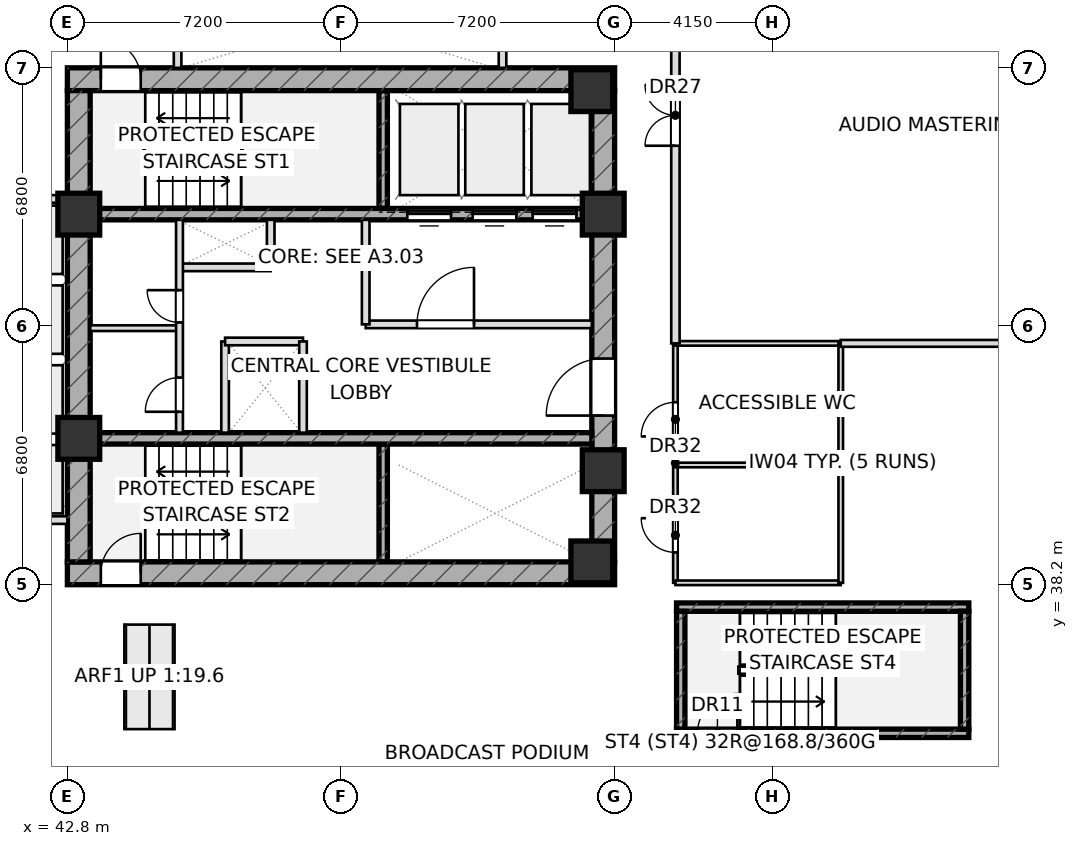
"""IFC4 building model, lengths in metres.
Left out: names, types, materials, properties, quantities, classifications, styles, units other than length and angle.
Written with IfcOpenShell. Run it as: python <this file> out.ifc"""

import sys

from ifc_helpers import new_model, si_unit, direction, frame, frame_2d, origin, origin_2d, place, context, subcontext, project, spatial, rectangle, extrude, element, fill, save


model = new_model("IFC4")
c1 = context("Model", 3, precision=1e-05, world=origin(), true_north=direction((0.0, 1.0)))
c2 = subcontext(c1, "Body", "Model", "MODEL_VIEW")
j1 = project(units=[si_unit("LENGTHUNIT", "METRE"), si_unit("PLANEANGLEUNIT", "RADIAN")], contexts=[c1])
p1 = place(None, origin())
s1 = spatial("IfcSite", under=j1, at=p1, CompositionType="ELEMENT")
p2 = place(p1, origin())
s2 = spatial("IfcBuilding", under=s1, at=p2, CompositionType="ELEMENT")
p3 = place(p2, frame((0.0, 0.0, 11.4)))
s3 = spatial("IfcBuildingStorey", under=s2, at=p3, CompositionType="ELEMENT", Elevation=11.4)
for number, where, z_axis, x_axis in (
    (1, (51.11, 48.1, 0.0), (0.0, 0.0, 1.0), (0.0, 1.0, 0.0)),
    (2, (51.11, 38.8, 0.0), (0.0, 0.0, 1.0), (0.0, 1.0, 0.0)),
):
    element("IfcWall", number, at=place(p3, frame(where, z_axis=z_axis, x_axis=x_axis)), inside=s3, PredefinedType="SHEAR", context=c2, shape_type="SweptSolid", body=[
        extrude(rectangle(XDim=3.1, YDim=0.22, at=frame_2d((1.55, 0.0))), origin(), (0.0, 0.0, 1.0), 5.05),
    ])
p4 = place(p3, frame((58.83, 34.29, 0.0), z_axis=(0.0, 0.0, 1.0), x_axis=(1.0, 0.0, 0.0)))
e3 = element("IfcWall", 3, at=p4, inside=s3, PredefinedType="SHEAR", context=c2, shape_type="SweptSolid", body=[
    extrude(rectangle(XDim=7.69, YDim=0.22, at=frame_2d((3.845, 0.0))), origin(), (0.0, 0.0, 1.0), 5.05),
])
p5 = place(p4, frame((0.55, 0.0, 0.0)))
e4 = element("IfcOpeningElement", 4, at=p5, cuts=e3, PredefinedType="OPENING", context=c2, shape_type="SweptSolid", body=[
    extrude(rectangle(XDim=1.05, YDim=2.2, at=frame_2d((0.525, 1.1))), frame((0.0, 0.12, 0.0), z_axis=(0.0, -1.0, 0.0), x_axis=(1.0, 0.0, 0.0)), (0.0, 0.0, 1.0), 0.24),
])
p6 = place(p3, frame((58.83, 37.61, 0.0), z_axis=(0.0, 0.0, 1.0), x_axis=(1.0, 0.0, 0.0)))
e5 = element("IfcWall", 5, at=p6, inside=s3, PredefinedType="SHEAR", context=c2, shape_type="SweptSolid", body=[
    extrude(rectangle(XDim=7.69, YDim=0.22, at=frame_2d((3.845, 0.0))), origin(), (0.0, 0.0, 1.0), 5.05),
])
for number, where, z_axis, x_axis in (
    (6, (66.41, 34.4, 0.0), (0.0, 0.0, 1.0), (0.0, 1.0, 0.0)),
    (7, (58.94, 34.4, 0.0), (0.0, 0.0, 1.0), (0.0, 1.0, 0.0)),
):
    element("IfcWall", number, at=place(p3, frame(where, z_axis=z_axis, x_axis=x_axis)), inside=s3, PredefinedType="SHEAR", context=c2, shape_type="SweptSolid", body=[
        extrude(rectangle(XDim=3.1, YDim=0.22, at=frame_2d((1.55, 0.0))), origin(), (0.0, 0.0, 1.0), 5.05),
    ])
p7 = place(p3, frame((42.8, 51.5, 0.0), z_axis=(0.0, 0.0, 1.0), x_axis=(1.0, 0.0, 0.0)))
e8 = element("IfcWall", 8, at=p7, inside=s3, PredefinedType="SHEAR", context=c2, shape_type="SweptSolid", body=[
    extrude(rectangle(XDim=14.4, YDim=0.6, at=frame_2d((7.2, 0.0))), origin(), (0.0, 0.0, 1.0), 5.05),
])
p8 = place(p7, frame((0.88, 0.0, 0.0)))
e9 = element("IfcOpeningElement", 9, at=p8, cuts=e8, PredefinedType="OPENING", context=c2, shape_type="SweptSolid", body=[
    extrude(rectangle(XDim=1.05, YDim=2.2, at=frame_2d((0.525, 1.1))), frame((0.0, 0.31, 0.0), z_axis=(0.0, -1.0, 0.0), x_axis=(1.0, 0.0, 0.0)), (0.0, 0.0, 1.0), 0.62),
])
p9 = place(p3, frame((42.8, 38.5, 0.0), z_axis=(0.0, 0.0, 1.0), x_axis=(1.0, 0.0, 0.0)))
e10 = element("IfcWall", 10, at=p9, inside=s3, PredefinedType="SHEAR", context=c2, shape_type="SweptSolid", body=[
    extrude(rectangle(XDim=14.4, YDim=0.6, at=frame_2d((7.2, 0.0))), origin(), (0.0, 0.0, 1.0), 5.05),
])
p10 = place(p9, frame((0.88, 0.0, 0.0)))
e11 = element("IfcOpeningElement", 11, at=p10, cuts=e10, PredefinedType="OPENING", context=c2, shape_type="SweptSolid", body=[
    extrude(rectangle(XDim=1.05, YDim=2.2, at=frame_2d((0.525, 1.1))), frame((0.0, 0.31, 0.0), z_axis=(0.0, -1.0, 0.0), x_axis=(1.0, 0.0, 0.0)), (0.0, 0.0, 1.0), 0.62),
])
p11 = place(p3, frame((43.1, 38.8, 0.0), z_axis=(0.0, 0.0, 1.0), x_axis=(0.0, 1.0, 0.0)))
e12 = element("IfcWall", 12, at=p11, inside=s3, PredefinedType="SHEAR", context=c2, shape_type="SweptSolid", body=[
    extrude(rectangle(XDim=12.4, YDim=0.6, at=frame_2d((6.2, 0.0))), origin(), (0.0, 0.0, 1.0), 5.05),
])
p12 = place(p3, frame((56.9, 38.8, 0.0), z_axis=(0.0, 0.0, 1.0), x_axis=(0.0, 1.0, 0.0)))
e13 = element("IfcWall", 13, at=p12, inside=s3, PredefinedType="SHEAR", context=c2, shape_type="SweptSolid", body=[
    extrude(rectangle(XDim=12.4, YDim=0.6, at=frame_2d((6.2, 0.0))), origin(), (0.0, 0.0, 1.0), 5.05),
])
p13 = place(p12, frame((3.85, 0.0, 0.0)))
e14 = element("IfcOpeningElement", 14, at=p13, cuts=e13, PredefinedType="OPENING", context=c2, shape_type="SweptSolid", body=[
    extrude(rectangle(XDim=1.5, YDim=2.2, at=frame_2d((0.75, 1.1))), frame((0.0, 0.31, 0.0), z_axis=(0.0, -1.0, 0.0), x_axis=(1.0, 0.0, 0.0)), (0.0, 0.0, 1.0), 0.62),
])
p14 = place(p3, frame((43.4, 47.95, 0.0), z_axis=(0.0, 0.0, 1.0), x_axis=(1.0, 0.0, 0.0)))
e15 = element("IfcWall", 15, at=p14, inside=s3, PredefinedType="SHEAR", context=c2, shape_type="SweptSolid", body=[
    extrude(rectangle(XDim=13.2, YDim=0.3, at=frame_2d((6.6, 0.0))), origin(), (0.0, 0.0, 1.0), 5.05),
])
p15 = place(p14, frame((8.345, 0.0, 0.0)))
e16 = element("IfcOpeningElement", 16, at=p15, cuts=e15, PredefinedType="OPENING", context=c2, shape_type="SweptSolid", body=[
    extrude(rectangle(XDim=1.15, YDim=2.2, at=frame_2d((0.575, 1.1))), frame((0.0, 0.16, 0.0), z_axis=(0.0, -1.0, 0.0), x_axis=(1.0, 0.0, 0.0)), (0.0, 0.0, 1.0), 0.32),
])
p16 = place(p14, frame((10.065, 0.0, 0.0)))
e17 = element("IfcOpeningElement", 17, at=p16, cuts=e15, PredefinedType="OPENING", context=c2, shape_type="SweptSolid", body=[
    extrude(rectangle(XDim=1.15, YDim=2.2, at=frame_2d((0.575, 1.1))), frame((0.0, 0.16, 0.0), z_axis=(0.0, -1.0, 0.0), x_axis=(1.0, 0.0, 0.0)), (0.0, 0.0, 1.0), 0.32),
])
p17 = place(p14, frame((11.645, 0.0, 0.0)))
e18 = element("IfcOpeningElement", 18, at=p17, cuts=e15, PredefinedType="OPENING", context=c2, shape_type="SweptSolid", body=[
    extrude(rectangle(XDim=1.15, YDim=2.2, at=frame_2d((0.575, 1.1))), frame((0.0, 0.16, 0.0), z_axis=(0.0, -1.0, 0.0), x_axis=(1.0, 0.0, 0.0)), (0.0, 0.0, 1.0), 0.32),
])
p18 = place(p3, frame((43.4, 42.05, 0.0), z_axis=(0.0, 0.0, 1.0), x_axis=(1.0, 0.0, 0.0)))
e19 = element("IfcWall", 19, at=p18, inside=s3, PredefinedType="SHEAR", context=c2, shape_type="SweptSolid", body=[
    extrude(rectangle(XDim=13.2, YDim=0.3, at=frame_2d((6.6, 0.0))), origin(), (0.0, 0.0, 1.0), 5.05),
])
for number, where, z_axis, x_axis in (
    (20, (43.1, 47.95, 0.0), (0.0, 0.0, 1.0), (1.0, 0.0, 0.0)),
    (21, (56.9, 47.95, 0.0), (0.0, 0.0, 1.0), (1.0, 0.0, 0.0)),
    (22, (56.6, 51.2, 0.0), (0.0, 0.0, 1.0), (1.0, 0.0, 0.0)),
    (23, (43.1, 42.05, 0.0), (0.0, 0.0, 1.0), (1.0, 0.0, 0.0)),
    (24, (56.9, 41.2, 0.0), (0.0, 0.0, 1.0), (1.0, 0.0, 0.0)),
    (25, (56.6, 38.8, 0.0), (0.0, 0.0, 1.0), (1.0, 0.0, 0.0)),
):
    element("IfcColumn", number, at=place(p3, frame(where, z_axis=z_axis, x_axis=x_axis)), inside=s3, PredefinedType="COLUMN", context=c2, shape_type="SweptSolid", body=[
        extrude(rectangle(XDim=1.1, YDim=1.1, at=origin_2d()), origin(), (0.0, 0.0, 1.0), 5.05),
    ])
for number, where, z_axis, x_axis in (
    (26, (40.3, 39.9, 0.0), (0.0, 0.0, 1.0), (1.0, 0.0, 0.0)),
    (27, (40.3, 48.35, 0.0), (0.0, 0.0, 1.0), (1.0, 0.0, 0.0)),
    (28, (45.7, 51.8, 0.0), (0.0, 0.0, 1.0), (0.0, 1.0, 0.0)),
    (29, (54.25, 51.8, 0.0), (0.0, 0.0, 1.0), (0.0, 1.0, 0.0)),
):
    element("IfcWall", number, at=place(p3, frame(where, z_axis=z_axis, x_axis=x_axis)), inside=s3, PredefinedType="PARTITIONING", context=c2, shape_type="SweptSolid", body=[
        extrude(rectangle(XDim=2.5, YDim=0.2, at=frame_2d((1.25, 0.0))), origin(), (0.0, 0.0, 1.0), 5.05),
    ])
p19 = place(p3, frame((45.75, 46.55, 0.0), z_axis=(0.0, 0.0, 1.0), x_axis=(1.0, 0.0, 0.0)))
e30 = element("IfcWall", 30, at=p19, inside=s3, PredefinedType="PARTITIONING", context=c2, shape_type="SweptSolid", body=[
    extrude(rectangle(XDim=2.4, YDim=0.2, at=frame_2d((1.2, 0.0))), origin(), (0.0, 0.0, 1.0), 5.05),
])
p20 = place(p3, frame((48.15, 46.55, 0.0), z_axis=(0.0, 0.0, 1.0), x_axis=(0.0, 1.0, 0.0)))
e31 = element("IfcWall", 31, at=p20, inside=s3, PredefinedType="PARTITIONING", context=c2, shape_type="SweptSolid", body=[
    extrude(rectangle(XDim=1.25, YDim=0.2, at=frame_2d((0.625, 0.0))), origin(), (0.0, 0.0, 1.0), 5.05),
])
p21 = place(p3, frame((46.95, 42.2, 0.0), z_axis=(0.0, 0.0, 1.0), x_axis=(0.0, 1.0, 0.0)))
e32 = element("IfcWall", 32, at=p21, inside=s3, PredefinedType="PARTITIONING", context=c2, shape_type="SweptSolid", body=[
    extrude(rectangle(XDim=2.4, YDim=0.2, at=frame_2d((1.2, 0.0))), origin(), (0.0, 0.0, 1.0), 5.05),
])
p22 = place(p3, frame((46.95, 44.6, 0.0), z_axis=(0.0, 0.0, 1.0), x_axis=(1.0, 0.0, 0.0)))
e33 = element("IfcWall", 33, at=p22, inside=s3, PredefinedType="PARTITIONING", context=c2, shape_type="SweptSolid", body=[
    extrude(rectangle(XDim=2.05, YDim=0.2, at=frame_2d((1.025, 0.0))), origin(), (0.0, 0.0, 1.0), 5.05),
])
p23 = place(p3, frame((50.65, 45.05, 0.0), z_axis=(0.0, 0.0, 1.0), x_axis=(1.0, 0.0, 0.0)))
e34 = element("IfcWall", 34, at=p23, inside=s3, PredefinedType="PARTITIONING", context=c2, shape_type="SweptSolid", body=[
    extrude(rectangle(XDim=5.95, YDim=0.2, at=frame_2d((2.975, 0.0))), origin(), (0.0, 0.0, 1.0), 5.05),
])
p24 = place(p23, frame((1.35, 0.0, 0.0)))
e35 = element("IfcOpeningElement", 35, at=p24, cuts=e34, PredefinedType="OPENING", context=c2, shape_type="SweptSolid", body=[
    extrude(rectangle(XDim=1.5, YDim=2.2, at=frame_2d((0.75, 1.1))), frame((0.0, 0.11, 0.0), z_axis=(0.0, -1.0, 0.0), x_axis=(1.0, 0.0, 0.0)), (0.0, 0.0, 1.0), 0.22),
])
p25 = place(p3, frame((50.65, 45.05, 0.0), z_axis=(0.0, 0.0, 1.0), x_axis=(0.0, 1.0, 0.0)))
e36 = element("IfcWall", 36, at=p25, inside=s3, PredefinedType="PARTITIONING", context=c2, shape_type="SweptSolid", body=[
    extrude(rectangle(XDim=2.75, YDim=0.2, at=frame_2d((1.375, 0.0))), origin(), (0.0, 0.0, 1.0), 5.05),
])
p26 = place(p3, frame((43.4, 44.95, 0.0), z_axis=(0.0, 0.0, 1.0), x_axis=(1.0, 0.0, 0.0)))
e37 = element("IfcWall", 37, at=p26, inside=s3, PredefinedType="PARTITIONING", context=c2, shape_type="SweptSolid", body=[
    extrude(rectangle(XDim=2.35, YDim=0.15, at=frame_2d((1.175, 0.0))), origin(), (0.0, 0.0, 1.0), 5.05),
])
p27 = place(p3, frame((45.75, 42.2, 0.0), z_axis=(0.0, 0.0, 1.0), x_axis=(0.0, 1.0, 0.0)))
e38 = element("IfcWall", 38, at=p27, inside=s3, PredefinedType="PARTITIONING", context=c2, shape_type="SweptSolid", body=[
    extrude(rectangle(XDim=5.6, YDim=0.18, at=frame_2d((2.8, 0.0))), origin(), (0.0, 0.0, 1.0), 5.05),
])
p28 = place(p27, frame((0.55, 0.0, 0.0)))
e39 = element("IfcOpeningElement", 39, at=p28, cuts=e38, PredefinedType="OPENING", context=c2, shape_type="SweptSolid", body=[
    extrude(rectangle(XDim=0.9, YDim=2.05, at=frame_2d((0.45, 1.025))), frame((0.0, 0.1, 0.0), z_axis=(0.0, -1.0, 0.0), x_axis=(1.0, 0.0, 0.0)), (0.0, 0.0, 1.0), 0.2),
])
p29 = place(p27, frame((2.9, 0.0, 0.0)))
e40 = element("IfcOpeningElement", 40, at=p29, cuts=e38, PredefinedType="OPENING", context=c2, shape_type="SweptSolid", body=[
    extrude(rectangle(XDim=0.85, YDim=2.05, at=frame_2d((0.425, 1.025))), frame((0.0, 0.1, 0.0), z_axis=(0.0, -1.0, 0.0), x_axis=(1.0, 0.0, 0.0)), (0.0, 0.0, 1.0), 0.2),
])
p30 = place(p3, frame((58.8, 38.25, 0.0), z_axis=(0.0, 0.0, 1.0), x_axis=(0.0, 1.0, 0.0)))
e41 = element("IfcWall", 41, at=p30, inside=s3, PredefinedType="PARTITIONING", context=c2, shape_type="SweptSolid", body=[
    extrude(rectangle(XDim=6.3, YDim=0.12, at=frame_2d((3.15, 0.0))), origin(), (0.0, 0.0, 1.0), 5.05),
])
p31 = place(p30, frame((0.8, 0.0, 0.0)))
e42 = element("IfcOpeningElement", 42, at=p31, cuts=e41, PredefinedType="OPENING", context=c2, shape_type="SweptSolid", body=[
    extrude(rectangle(XDim=0.9, YDim=2.05, at=frame_2d((0.45, 1.025))), frame((0.0, 0.07, 0.0), z_axis=(0.0, -1.0, 0.0), x_axis=(1.0, 0.0, 0.0)), (0.0, 0.0, 1.0), 0.14),
])
p32 = place(p30, frame((3.85, 0.0, 0.0)))
e43 = element("IfcOpeningElement", 43, at=p32, cuts=e41, PredefinedType="OPENING", context=c2, shape_type="SweptSolid", body=[
    extrude(rectangle(XDim=0.9, YDim=2.05, at=frame_2d((0.45, 1.025))), frame((0.0, 0.07, 0.0), z_axis=(0.0, -1.0, 0.0), x_axis=(1.0, 0.0, 0.0)), (0.0, 0.0, 1.0), 0.14),
])
for number, where, z_axis, x_axis in (
    (44, (58.8, 38.25, 0.0), (0.0, 0.0, 1.0), (1.0, 0.0, 0.0)),
    (45, (58.8, 41.35, 0.0), (0.0, 0.0, 1.0), (1.0, 0.0, 0.0)),
    (46, (58.8, 44.55, 0.0), (0.0, 0.0, 1.0), (1.0, 0.0, 0.0)),
):
    element("IfcWall", number, at=place(p3, frame(where, z_axis=z_axis, x_axis=x_axis)), inside=s3, PredefinedType="PARTITIONING", context=c2, shape_type="SweptSolid", body=[
        extrude(rectangle(XDim=4.35, YDim=0.12, at=frame_2d((2.175, 0.0))), origin(), (0.0, 0.0, 1.0), 5.05),
    ])
p33 = place(p3, frame((63.15, 38.25, 0.0), z_axis=(0.0, 0.0, 1.0), x_axis=(0.0, 1.0, 0.0)))
e47 = element("IfcWall", 47, at=p33, inside=s3, PredefinedType="PARTITIONING", context=c2, shape_type="SweptSolid", body=[
    extrude(rectangle(XDim=6.3, YDim=0.12, at=frame_2d((3.15, 0.0))), origin(), (0.0, 0.0, 1.0), 5.05),
])
p34 = place(p3, frame((58.8, 44.55, 0.0), z_axis=(0.0, 0.0, 1.0), x_axis=(0.0, 1.0, 0.0)))
e48 = element("IfcWall", 48, at=p34, inside=s3, PredefinedType="PARTITIONING", context=c2, shape_type="SweptSolid", body=[
    extrude(rectangle(XDim=11.55, YDim=0.22, at=frame_2d((5.775, 0.0))), origin(), (0.0, 0.0, 1.0), 4.125),
])
p35 = place(p34, frame((5.2, 0.0, 0.0)))
e49 = element("IfcOpeningElement", 49, at=p35, cuts=e48, PredefinedType="OPENING", context=c2, shape_type="SweptSolid", body=[
    extrude(rectangle(XDim=1.6, YDim=2.3, at=frame_2d((0.8, 1.15))), frame((0.0, 0.12, 0.0), z_axis=(0.0, -1.0, 0.0), x_axis=(1.0, 0.0, 0.0)), (0.0, 0.0, 1.0), 0.24),
])
p36 = place(p3, frame((63.15, 44.55, 0.0), z_axis=(0.0, 0.0, 1.0), x_axis=(1.0, 0.0, 0.0)))
e50 = element("IfcWall", 50, at=p36, inside=s3, PredefinedType="PARTITIONING", context=c2, shape_type="SweptSolid", body=[
    extrude(rectangle(XDim=18.14, YDim=0.18, at=frame_2d((9.07, 0.0))), origin(), (0.0, 0.0, 1.0), 5.05),
])
p37 = place(p36, frame((8.27, 0.0, 1.05)))
e51 = element("IfcOpeningElement", 51, at=p37, cuts=e50, PredefinedType="OPENING", context=c2, shape_type="SweptSolid", body=[
    extrude(rectangle(XDim=1.6, YDim=1.35, at=frame_2d((0.8, 0.675))), frame((0.0, 0.1, 0.0), z_axis=(0.0, -1.0, 0.0), x_axis=(1.0, 0.0, 0.0)), (0.0, 0.0, 1.0), 0.2),
])
p38 = place(p3, frame((49.0, 42.2, 0.0), z_axis=(0.0, 0.0, 1.0), x_axis=(0.0, 1.0, 0.0)))
e52 = element("IfcWall", 52, at=p38, inside=s3, PredefinedType="PARTITIONING", context=c2, shape_type="SweptSolid", body=[
    extrude(rectangle(XDim=2.4, YDim=0.2, at=frame_2d((1.2, 0.0))), origin(), (0.0, 0.0, 1.0), 5.05),
])
p39 = place(p8, origin())
e53 = element("IfcDoor", 53, at=p39, inside=s3, OperationType="SINGLE_SWING_LEFT", PredefinedType="DOOR", context=c2, shape_type="SweptSolid", body=[
    extrude(rectangle(XDim=1.05, YDim=2.2, at=frame_2d((0.525, 1.1))), frame((0.0, 0.025, 0.0), z_axis=(0.0, -1.0, 0.0), x_axis=(1.0, 0.0, 0.0)), (0.0, 0.0, 1.0), 0.05),
])
fill(e9, e53)
p40 = place(p10, origin())
e54 = element("IfcDoor", 54, at=p40, inside=s3, OperationType="SINGLE_SWING_RIGHT", PredefinedType="DOOR", context=c2, shape_type="SweptSolid", body=[
    extrude(rectangle(XDim=1.05, YDim=2.2, at=frame_2d((0.525, 1.1))), frame((0.0, 0.025, 0.0), z_axis=(0.0, -1.0, 0.0), x_axis=(1.0, 0.0, 0.0)), (0.0, 0.0, 1.0), 0.05),
])
fill(e11, e54)
p41 = place(p13, origin())
e55 = element("IfcDoor", 55, at=p41, inside=s3, OperationType="SINGLE_SWING_LEFT", PredefinedType="DOOR", context=c2, shape_type="SweptSolid", body=[
    extrude(rectangle(XDim=1.5, YDim=2.2, at=frame_2d((0.75, 1.1))), frame((0.0, 0.025, 0.0), z_axis=(0.0, -1.0, 0.0), x_axis=(1.0, 0.0, 0.0)), (0.0, 0.0, 1.0), 0.05),
])
fill(e14, e55)
p42 = place(p24, origin())
e56 = element("IfcDoor", 56, at=p42, inside=s3, OperationType="SINGLE_SWING_RIGHT", PredefinedType="DOOR", context=c2, shape_type="SweptSolid", body=[
    extrude(rectangle(XDim=1.5, YDim=2.2, at=frame_2d((0.75, 1.1))), frame((0.0, 0.025, 0.0), z_axis=(0.0, -1.0, 0.0), x_axis=(1.0, 0.0, 0.0)), (0.0, 0.0, 1.0), 0.05),
])
fill(e35, e56)
p43 = place(p5, origin())
e57 = element("IfcDoor", 57, at=p43, inside=s3, OperationType="SINGLE_SWING_RIGHT", PredefinedType="DOOR", context=c2, shape_type="SweptSolid", body=[
    extrude(rectangle(XDim=1.05, YDim=2.2, at=frame_2d((0.525, 1.1))), frame((0.0, 0.025, 0.0), z_axis=(0.0, -1.0, 0.0), x_axis=(1.0, 0.0, 0.0)), (0.0, 0.0, 1.0), 0.05),
])
fill(e4, e57)
p44 = place(p28, origin())
e58 = element("IfcDoor", 58, at=p44, inside=s3, OperationType="SINGLE_SWING_LEFT", PredefinedType="DOOR", context=c2, shape_type="SweptSolid", body=[
    extrude(rectangle(XDim=0.9, YDim=2.05, at=frame_2d((0.45, 1.025))), frame((0.0, 0.025, 0.0), z_axis=(0.0, -1.0, 0.0), x_axis=(1.0, 0.0, 0.0)), (0.0, 0.0, 1.0), 0.05),
])
fill(e39, e58)
p45 = place(p29, origin())
e59 = element("IfcDoor", 59, at=p45, inside=s3, OperationType="SINGLE_SWING_RIGHT", PredefinedType="DOOR", context=c2, shape_type="SweptSolid", body=[
    extrude(rectangle(XDim=0.85, YDim=2.05, at=frame_2d((0.425, 1.025))), frame((0.0, 0.025, 0.0), z_axis=(0.0, -1.0, 0.0), x_axis=(1.0, 0.0, 0.0)), (0.0, 0.0, 1.0), 0.05),
])
fill(e40, e59)
p46 = place(p31, origin())
e60 = element("IfcDoor", 60, at=p46, inside=s3, OperationType="SINGLE_SWING_RIGHT", PredefinedType="DOOR", context=c2, shape_type="SweptSolid", body=[
    extrude(rectangle(XDim=0.9, YDim=2.05, at=frame_2d((0.45, 1.025))), frame((0.0, 0.025, 0.0), z_axis=(0.0, -1.0, 0.0), x_axis=(1.0, 0.0, 0.0)), (0.0, 0.0, 1.0), 0.05),
])
fill(e42, e60)
p47 = place(p32, origin())
e61 = element("IfcDoor", 61, at=p47, inside=s3, OperationType="SINGLE_SWING_LEFT", PredefinedType="DOOR", context=c2, shape_type="SweptSolid", body=[
    extrude(rectangle(XDim=0.9, YDim=2.05, at=frame_2d((0.45, 1.025))), frame((0.0, 0.025, 0.0), z_axis=(0.0, -1.0, 0.0), x_axis=(1.0, 0.0, 0.0)), (0.0, 0.0, 1.0), 0.05),
])
fill(e43, e61)
p48 = place(p35, origin())
e62 = element("IfcDoor", 62, at=p48, inside=s3, OperationType="DOUBLE_DOOR_SINGLE_SWING", PredefinedType="DOOR", context=c2, shape_type="SweptSolid", body=[
    extrude(rectangle(XDim=1.6, YDim=2.3, at=frame_2d((0.8, 1.15))), frame((0.0, 0.025, 0.0), z_axis=(0.0, -1.0, 0.0), x_axis=(1.0, 0.0, 0.0)), (0.0, 0.0, 1.0), 0.05),
])
fill(e49, e62)
p49 = place(p15, origin())
e63 = element("IfcDoor", 63, at=p49, inside=s3, OperationType="SLIDING_TO_LEFT", PredefinedType="DOOR", context=c2, shape_type="SweptSolid", body=[
    extrude(rectangle(XDim=1.15, YDim=2.2, at=frame_2d((0.575, 1.1))), frame((0.0, 0.025, 0.0), z_axis=(0.0, -1.0, 0.0), x_axis=(1.0, 0.0, 0.0)), (0.0, 0.0, 1.0), 0.05),
])
fill(e16, e63)
p50 = place(p16, origin())
e64 = element("IfcDoor", 64, at=p50, inside=s3, OperationType="SLIDING_TO_LEFT", PredefinedType="DOOR", context=c2, shape_type="SweptSolid", body=[
    extrude(rectangle(XDim=1.15, YDim=2.2, at=frame_2d((0.575, 1.1))), frame((0.0, 0.025, 0.0), z_axis=(0.0, -1.0, 0.0), x_axis=(1.0, 0.0, 0.0)), (0.0, 0.0, 1.0), 0.05),
])
fill(e17, e64)
p51 = place(p17, origin())
e65 = element("IfcDoor", 65, at=p51, inside=s3, OperationType="SLIDING_TO_LEFT", PredefinedType="DOOR", context=c2, shape_type="SweptSolid", body=[
    extrude(rectangle(XDim=1.15, YDim=2.2, at=frame_2d((0.575, 1.1))), frame((0.0, 0.025, 0.0), z_axis=(0.0, -1.0, 0.0), x_axis=(1.0, 0.0, 0.0)), (0.0, 0.0, 1.0), 0.05),
])
fill(e18, e65)
save(model, sys.argv[1])
